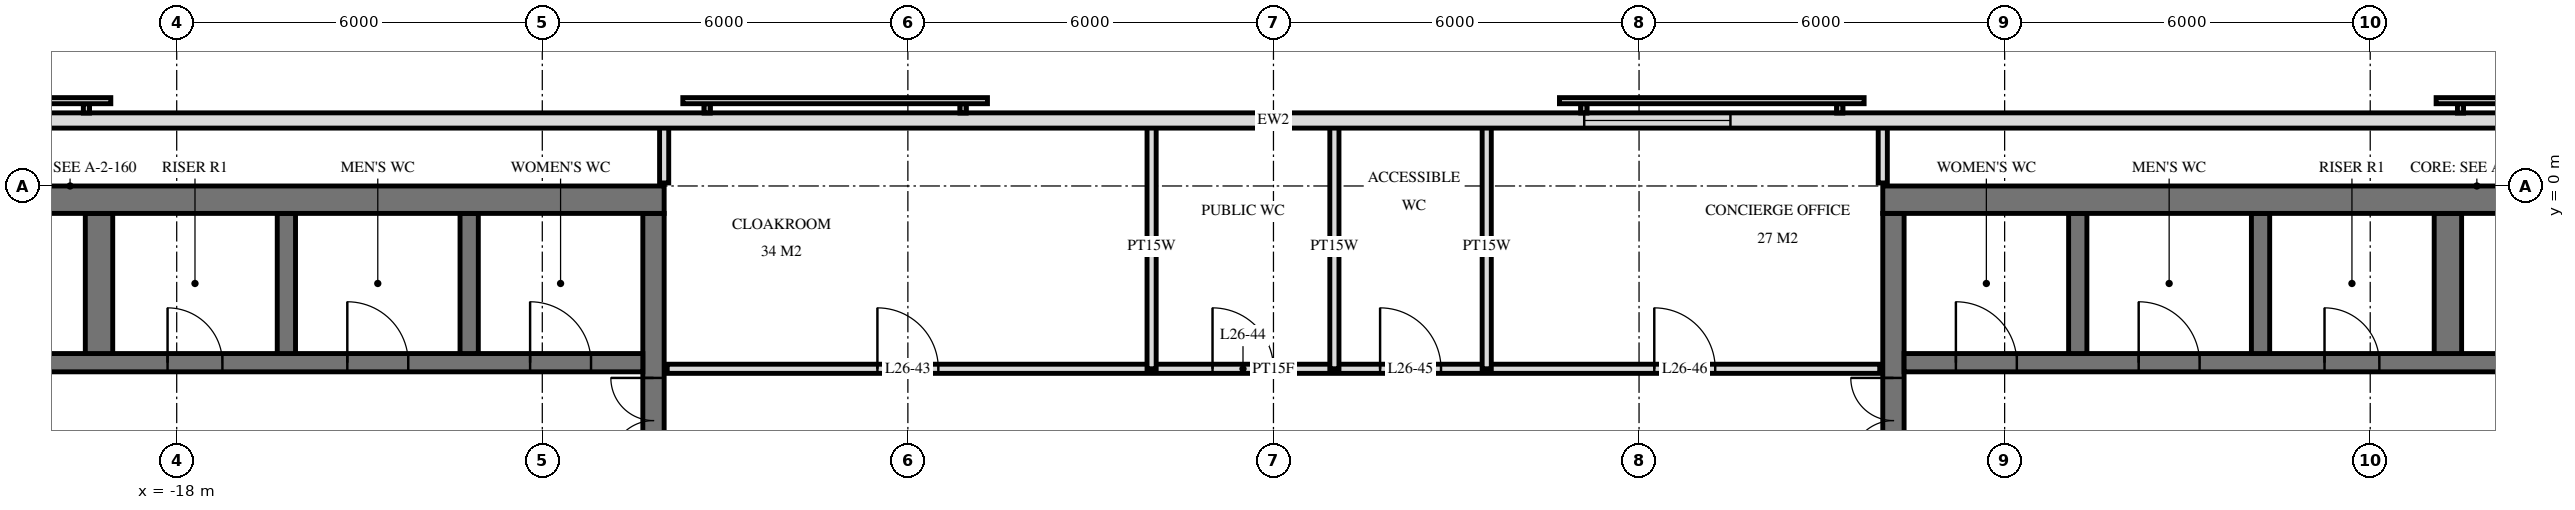
"""IFC4 building model, lengths in metres.
Left out: names, types, materials, properties, quantities, classifications, styles, units other than length and angle.
Written with IfcOpenShell. Run it as: python <this file> out.ifc"""

import sys

from ifc_helpers import new_model, si_unit, direction, frame, frame_2d, origin, place, context, subcontext, project, spatial, rectangle, extrude, element, fill, save


model = new_model("IFC4")
c1 = context("Model", 3, precision=1e-05, world=origin(), true_north=direction((0.0, 1.0)))
c2 = subcontext(c1, "Body", "Model", "MODEL_VIEW")
j1 = project(units=[si_unit("LENGTHUNIT", "METRE"), si_unit("PLANEANGLEUNIT", "RADIAN")], contexts=[c1])
p1 = place(None, origin())
s1 = spatial("IfcSite", under=j1, at=p1, CompositionType="ELEMENT")
p2 = place(p1, origin())
s2 = spatial("IfcBuilding", under=s1, at=p2, CompositionType="ELEMENT")
p3 = place(p2, frame((0.0, 0.0, 103.2)))
s3 = spatial("IfcBuildingStorey", under=s2, at=p3, CompositionType="ELEMENT", Elevation=103.2)
p4 = place(p3, frame((-29.5, -0.225, 0.0), z_axis=(0.0, 0.0, 1.0), x_axis=(1.0, 0.0, 0.0)))
e1 = element("IfcWall", 1, at=p4, inside=s3, PredefinedType="SHEAR", context=c2, shape_type="SweptSolid", body=[
    extrude(rectangle(XDim=19.5, YDim=0.45, at=frame_2d((9.75, 0.0))), origin(), (0.0, 0.0, 1.0), 3.6),
])
p5 = place(p3, frame((-10.175, -14.55, 0.0), z_axis=(0.0, 0.0, 1.0), x_axis=(0.0, 1.0, 0.0)))
e2 = element("IfcWall", 2, at=p5, inside=s3, PredefinedType="SHEAR", context=c2, shape_type="SweptSolid", body=[
    extrude(rectangle(XDim=14.1, YDim=0.35, at=frame_2d((7.05, 0.0))), origin(), (0.0, 0.0, 1.0), 3.6),
])
p6 = place(p5, frame((8.4, 0.0, 0.0)))
e3 = element("IfcOpeningElement", 3, at=p6, cuts=e2, PredefinedType="OPENING", context=c2, shape_type="SweptSolid", body=[
    extrude(rectangle(XDim=1.4, YDim=2.4, at=frame_2d((0.7, 1.2))), frame((0.0, 0.185, 0.0), z_axis=(0.0, -1.0, 0.0), x_axis=(1.0, 0.0, 0.0)), (0.0, 0.0, 1.0), 0.37),
])
p7 = place(p5, frame((10.0, 0.0, 0.0)))
e4 = element("IfcOpeningElement", 4, at=p7, cuts=e2, PredefinedType="OPENING", context=c2, shape_type="SweptSolid", body=[
    extrude(rectangle(XDim=1.4, YDim=2.4, at=frame_2d((0.7, 1.2))), frame((0.0, 0.185, 0.0), z_axis=(0.0, -1.0, 0.0), x_axis=(1.0, 0.0, 0.0)), (0.0, 0.0, 1.0), 0.37),
])
p8 = place(p5, frame((4.0, 0.0, 0.0)))
e5 = element("IfcOpeningElement", 5, at=p8, cuts=e2, PredefinedType="OPENING", context=c2, shape_type="SweptSolid", body=[
    extrude(rectangle(XDim=1.2, YDim=2.1, at=frame_2d((0.6, 1.05))), frame((0.0, 0.185, 0.0), z_axis=(0.0, -1.0, 0.0), x_axis=(1.0, 0.0, 0.0)), (0.0, 0.0, 1.0), 0.37),
])
p9 = place(p3, frame((-29.05, -2.9, 0.0), z_axis=(0.0, 0.0, 1.0), x_axis=(1.0, 0.0, 0.0)))
e6 = element("IfcWall", 6, at=p9, inside=s3, PredefinedType="SHEAR", context=c2, shape_type="SweptSolid", body=[
    extrude(rectangle(XDim=18.7, YDim=0.3, at=frame_2d((9.35, 0.0))), origin(), (0.0, 0.0, 1.0), 3.6),
])
p10 = place(p9, frame((2.95, 0.0, 0.0)))
e7 = element("IfcOpeningElement", 7, at=p10, cuts=e6, PredefinedType="OPENING", context=c2, shape_type="SweptSolid", body=[
    extrude(rectangle(XDim=1.1, YDim=2.1, at=frame_2d((0.55, 1.05))), frame((0.0, 0.16, 0.0), z_axis=(0.0, -1.0, 0.0), x_axis=(1.0, 0.0, 0.0)), (0.0, 0.0, 1.0), 0.32),
])
p11 = place(p9, frame((0.55, 0.0, 0.0)))
e8 = element("IfcOpeningElement", 8, at=p11, cuts=e6, PredefinedType="OPENING", context=c2, shape_type="SweptSolid", body=[
    extrude(rectangle(XDim=1.1, YDim=2.1, at=frame_2d((0.55, 1.05))), frame((0.0, 0.16, 0.0), z_axis=(0.0, -1.0, 0.0), x_axis=(1.0, 0.0, 0.0)), (0.0, 0.0, 1.0), 0.32),
])
p12 = place(p9, frame((10.9, 0.0, 0.0)))
e9 = element("IfcOpeningElement", 9, at=p12, cuts=e6, PredefinedType="OPENING", context=c2, shape_type="SweptSolid", body=[
    extrude(rectangle(XDim=0.9, YDim=2.1, at=frame_2d((0.45, 1.05))), frame((0.0, 0.16, 0.0), z_axis=(0.0, -1.0, 0.0), x_axis=(1.0, 0.0, 0.0)), (0.0, 0.0, 1.0), 0.32),
])
p13 = place(p9, frame((16.85, 0.0, 0.0)))
e10 = element("IfcOpeningElement", 10, at=p13, cuts=e6, PredefinedType="OPENING", context=c2, shape_type="SweptSolid", body=[
    extrude(rectangle(XDim=1.0, YDim=2.1, at=frame_2d((0.5, 1.05))), frame((0.0, 0.16, 0.0), z_axis=(0.0, -1.0, 0.0), x_axis=(1.0, 0.0, 0.0)), (0.0, 0.0, 1.0), 0.32),
])
p14 = place(p9, frame((13.85, 0.0, 0.0)))
e11 = element("IfcOpeningElement", 11, at=p14, cuts=e6, PredefinedType="OPENING", context=c2, shape_type="SweptSolid", body=[
    extrude(rectangle(XDim=1.0, YDim=2.1, at=frame_2d((0.5, 1.05))), frame((0.0, 0.16, 0.0), z_axis=(0.0, -1.0, 0.0), x_axis=(1.0, 0.0, 0.0)), (0.0, 0.0, 1.0), 0.32),
])
for number, where, z_axis, x_axis in (
    (12, (-13.2, -2.75, 0.0), (0.0, 0.0, 1.0), (0.0, 1.0, 0.0)),
    (13, (-16.2, -2.75, 0.0), (0.0, 0.0, 1.0), (0.0, 1.0, 0.0)),
):
    element("IfcWall", number, at=place(p3, frame(where, z_axis=z_axis, x_axis=x_axis)), inside=s3, PredefinedType="SHEAR", context=c2, shape_type="SweptSolid", body=[
        extrude(rectangle(XDim=2.3, YDim=0.3, at=frame_2d((1.15, 0.0))), origin(), (0.0, 0.0, 1.0), 3.6),
    ])
p15 = place(p3, frame((-19.275, -2.75, 0.0), z_axis=(0.0, 0.0, 1.0), x_axis=(0.0, 1.0, 0.0)))
e14 = element("IfcWall", 14, at=p15, inside=s3, PredefinedType="SHEAR", context=c2, shape_type="SweptSolid", body=[
    extrude(rectangle(XDim=2.3, YDim=0.45, at=frame_2d((1.15, 0.0))), origin(), (0.0, 0.0, 1.0), 3.6),
])
p16 = place(p3, frame((10.0, -0.225, 0.0), z_axis=(0.0, 0.0, 1.0), x_axis=(1.0, 0.0, 0.0)))
e15 = element("IfcWall", 15, at=p16, inside=s3, PredefinedType="SHEAR", context=c2, shape_type="SweptSolid", body=[
    extrude(rectangle(XDim=19.5, YDim=0.45, at=frame_2d((9.75, 0.0))), origin(), (0.0, 0.0, 1.0), 3.6),
])
p17 = place(p3, frame((10.175, -14.55, 0.0), z_axis=(0.0, 0.0, 1.0), x_axis=(0.0, 1.0, 0.0)))
e16 = element("IfcWall", 16, at=p17, inside=s3, PredefinedType="SHEAR", context=c2, shape_type="SweptSolid", body=[
    extrude(rectangle(XDim=14.1, YDim=0.35, at=frame_2d((7.05, 0.0))), origin(), (0.0, 0.0, 1.0), 3.6),
])
p18 = place(p17, frame((8.4, 0.0, 0.0)))
e17 = element("IfcOpeningElement", 17, at=p18, cuts=e16, PredefinedType="OPENING", context=c2, shape_type="SweptSolid", body=[
    extrude(rectangle(XDim=1.4, YDim=2.4, at=frame_2d((0.7, 1.2))), frame((0.0, 0.185, 0.0), z_axis=(0.0, -1.0, 0.0), x_axis=(1.0, 0.0, 0.0)), (0.0, 0.0, 1.0), 0.37),
])
p19 = place(p17, frame((10.0, 0.0, 0.0)))
e18 = element("IfcOpeningElement", 18, at=p19, cuts=e16, PredefinedType="OPENING", context=c2, shape_type="SweptSolid", body=[
    extrude(rectangle(XDim=1.4, YDim=2.4, at=frame_2d((0.7, 1.2))), frame((0.0, 0.185, 0.0), z_axis=(0.0, -1.0, 0.0), x_axis=(1.0, 0.0, 0.0)), (0.0, 0.0, 1.0), 0.37),
])
p20 = place(p17, frame((4.0, 0.0, 0.0)))
e19 = element("IfcOpeningElement", 19, at=p20, cuts=e16, PredefinedType="OPENING", context=c2, shape_type="SweptSolid", body=[
    extrude(rectangle(XDim=1.2, YDim=2.1, at=frame_2d((0.6, 1.05))), frame((0.0, 0.185, 0.0), z_axis=(0.0, -1.0, 0.0), x_axis=(1.0, 0.0, 0.0)), (0.0, 0.0, 1.0), 0.37),
])
p21 = place(p3, frame((10.35, -2.9, 0.0), z_axis=(0.0, 0.0, 1.0), x_axis=(1.0, 0.0, 0.0)))
e20 = element("IfcWall", 20, at=p21, inside=s3, PredefinedType="SHEAR", context=c2, shape_type="SweptSolid", body=[
    extrude(rectangle(XDim=18.7, YDim=0.3, at=frame_2d((9.35, 0.0))), origin(), (0.0, 0.0, 1.0), 3.6),
])
p22 = place(p21, frame((14.65, 0.0, 0.0)))
e21 = element("IfcOpeningElement", 21, at=p22, cuts=e20, PredefinedType="OPENING", context=c2, shape_type="SweptSolid", body=[
    extrude(rectangle(XDim=1.1, YDim=2.1, at=frame_2d((0.55, 1.05))), frame((0.0, 0.16, 0.0), z_axis=(0.0, -1.0, 0.0), x_axis=(1.0, 0.0, 0.0)), (0.0, 0.0, 1.0), 0.32),
])
p23 = place(p21, frame((17.05, 0.0, 0.0)))
e22 = element("IfcOpeningElement", 22, at=p23, cuts=e20, PredefinedType="OPENING", context=c2, shape_type="SweptSolid", body=[
    extrude(rectangle(XDim=1.1, YDim=2.1, at=frame_2d((0.55, 1.05))), frame((0.0, 0.16, 0.0), z_axis=(0.0, -1.0, 0.0), x_axis=(1.0, 0.0, 0.0)), (0.0, 0.0, 1.0), 0.32),
])
p24 = place(p21, frame((6.9, 0.0, 0.0)))
e23 = element("IfcOpeningElement", 23, at=p24, cuts=e20, PredefinedType="OPENING", context=c2, shape_type="SweptSolid", body=[
    extrude(rectangle(XDim=0.9, YDim=2.1, at=frame_2d((0.45, 1.05))), frame((0.0, 0.16, 0.0), z_axis=(0.0, -1.0, 0.0), x_axis=(1.0, 0.0, 0.0)), (0.0, 0.0, 1.0), 0.32),
])
p25 = place(p21, frame((0.85, 0.0, 0.0)))
e24 = element("IfcOpeningElement", 24, at=p25, cuts=e20, PredefinedType="OPENING", context=c2, shape_type="SweptSolid", body=[
    extrude(rectangle(XDim=1.0, YDim=2.1, at=frame_2d((0.5, 1.05))), frame((0.0, 0.16, 0.0), z_axis=(0.0, -1.0, 0.0), x_axis=(1.0, 0.0, 0.0)), (0.0, 0.0, 1.0), 0.32),
])
p26 = place(p21, frame((3.85, 0.0, 0.0)))
e25 = element("IfcOpeningElement", 25, at=p26, cuts=e20, PredefinedType="OPENING", context=c2, shape_type="SweptSolid", body=[
    extrude(rectangle(XDim=1.0, YDim=2.1, at=frame_2d((0.5, 1.05))), frame((0.0, 0.16, 0.0), z_axis=(0.0, -1.0, 0.0), x_axis=(1.0, 0.0, 0.0)), (0.0, 0.0, 1.0), 0.32),
])
for number, where, z_axis, x_axis in (
    (26, (13.2, -2.75, 0.0), (0.0, 0.0, 1.0), (0.0, 1.0, 0.0)),
    (27, (16.2, -2.75, 0.0), (0.0, 0.0, 1.0), (0.0, 1.0, 0.0)),
):
    element("IfcWall", number, at=place(p3, frame(where, z_axis=z_axis, x_axis=x_axis)), inside=s3, PredefinedType="SHEAR", context=c2, shape_type="SweptSolid", body=[
        extrude(rectangle(XDim=2.3, YDim=0.3, at=frame_2d((1.15, 0.0))), origin(), (0.0, 0.0, 1.0), 3.6),
    ])
p27 = place(p3, frame((19.275, -2.75, 0.0), z_axis=(0.0, 0.0, 1.0), x_axis=(0.0, 1.0, 0.0)))
e28 = element("IfcWall", 28, at=p27, inside=s3, PredefinedType="SHEAR", context=c2, shape_type="SweptSolid", body=[
    extrude(rectangle(XDim=2.3, YDim=0.45, at=frame_2d((1.15, 0.0))), origin(), (0.0, 0.0, 1.0), 3.6),
])
p28 = place(p3, frame((28.775, 1.075, 0.0), z_axis=(0.0, 0.0, 1.0), x_axis=(-1.0, 0.0, 0.0)))
e29 = element("IfcWall", 29, at=p28, inside=s3, PredefinedType="SOLIDWALL", context=c2, shape_type="SweptSolid", body=[
    extrude(rectangle(XDim=57.551, YDim=0.25, at=frame_2d((28.775, 0.0))), origin(), (0.0, 0.0, 1.0), 3.3),
])
p29 = place(p28, frame((21.275, 0.0, 0.3)))
e30 = element("IfcOpeningElement", 30, at=p29, cuts=e29, PredefinedType="OPENING", context=c2, shape_type="SweptSolid", body=[
    extrude(rectangle(XDim=2.4, YDim=2.1, at=frame_2d((1.2, 1.05))), frame((0.0, 0.135, 0.0), z_axis=(0.0, -1.0, 0.0), x_axis=(1.0, 0.0, 0.0)), (0.0, 0.0, 1.0), 0.27),
])
p30 = place(p3, frame((10.0, 0.05, 0.0), z_axis=(0.0, 0.0, 1.0), x_axis=(0.0, 1.0, 0.0)))
e31 = element("IfcWall", 31, at=p30, inside=s3, PredefinedType="PARTITIONING", context=c2, shape_type="SweptSolid", body=[
    extrude(rectangle(XDim=0.97, YDim=0.15, at=frame_2d((0.485, 0.0))), origin(), (0.0, 0.0, 1.0), 3.32),
])
for number, where, z_axis, x_axis in (
    (32, (3.5, -3.0, 0.0), (0.0, 0.0, 1.0), (0.0, 1.0, 0.0)),
    (33, (1.0, -3.0, 0.0), (0.0, 0.0, 1.0), (0.0, 1.0, 0.0)),
    (34, (-2.0, -3.0, 0.0), (0.0, 0.0, 1.0), (0.0, 1.0, 0.0)),
):
    element("IfcWall", number, at=place(p3, frame(where, z_axis=z_axis, x_axis=x_axis)), inside=s3, PredefinedType="PLUMBINGWALL", context=c2, shape_type="SweptSolid", body=[
        extrude(rectangle(XDim=4.02, YDim=0.15, at=frame_2d((2.01, 0.0))), origin(), (0.0, 0.0, 1.0), 3.32),
    ])
p31 = place(p3, frame((-10.0, 0.05, 0.0), z_axis=(0.0, 0.0, 1.0), x_axis=(0.0, 1.0, 0.0)))
e35 = element("IfcWall", 35, at=p31, inside=s3, PredefinedType="PARTITIONING", context=c2, shape_type="SweptSolid", body=[
    extrude(rectangle(XDim=0.97, YDim=0.15, at=frame_2d((0.485, 0.0))), origin(), (0.0, 0.0, 1.0), 3.32),
])
p32 = place(p3, frame((-9.95, -3.0, 0.0), z_axis=(0.0, 0.0, 1.0), x_axis=(1.0, 0.0, 0.0)))
e36 = element("IfcWall", 36, at=p32, inside=s3, PredefinedType="PARTITIONING", context=c2, shape_type="SweptSolid", body=[
    extrude(rectangle(XDim=19.9, YDim=0.15, at=frame_2d((9.95, 0.0))), origin(), (0.0, 0.0, 1.0), 3.32),
])
p33 = place(p32, frame((3.45, 0.0, 0.0)))
e37 = element("IfcOpeningElement", 37, at=p33, cuts=e36, PredefinedType="OPENING", context=c2, shape_type="SweptSolid", body=[
    extrude(rectangle(XDim=1.0, YDim=2.1, at=frame_2d((0.5, 1.05))), frame((0.0, 0.085, 0.0), z_axis=(0.0, -1.0, 0.0), x_axis=(1.0, 0.0, 0.0)), (0.0, 0.0, 1.0), 0.17),
])
p34 = place(p32, frame((8.95, 0.0, 0.0)))
e38 = element("IfcOpeningElement", 38, at=p34, cuts=e36, PredefinedType="OPENING", context=c2, shape_type="SweptSolid", body=[
    extrude(rectangle(XDim=1.0, YDim=2.1, at=frame_2d((0.5, 1.05))), frame((0.0, 0.085, 0.0), z_axis=(0.0, -1.0, 0.0), x_axis=(1.0, 0.0, 0.0)), (0.0, 0.0, 1.0), 0.17),
])
p35 = place(p32, frame((11.7, 0.0, 0.0)))
e39 = element("IfcOpeningElement", 39, at=p35, cuts=e36, PredefinedType="OPENING", context=c2, shape_type="SweptSolid", body=[
    extrude(rectangle(XDim=1.0, YDim=2.1, at=frame_2d((0.5, 1.05))), frame((0.0, 0.085, 0.0), z_axis=(0.0, -1.0, 0.0), x_axis=(1.0, 0.0, 0.0)), (0.0, 0.0, 1.0), 0.17),
])
p36 = place(p32, frame((16.2, 0.0, 0.0)))
e40 = element("IfcOpeningElement", 40, at=p36, cuts=e36, PredefinedType="OPENING", context=c2, shape_type="SweptSolid", body=[
    extrude(rectangle(XDim=1.0, YDim=2.1, at=frame_2d((0.5, 1.05))), frame((0.0, 0.085, 0.0), z_axis=(0.0, -1.0, 0.0), x_axis=(1.0, 0.0, 0.0)), (0.0, 0.0, 1.0), 0.17),
])
p37 = place(p29, origin())
e41 = element("IfcWindow", 41, at=p37, inside=s3, PartitioningType="SINGLE_PANEL", PredefinedType="WINDOW", context=c2, shape_type="SweptSolid", body=[
    extrude(rectangle(XDim=2.4, YDim=2.1, at=frame_2d((1.2, 1.05))), frame((0.0, 0.03, 0.0), z_axis=(0.0, -1.0, 0.0), x_axis=(1.0, 0.0, 0.0)), (0.0, 0.0, 1.0), 0.06),
])
fill(e30, e41)
p38 = place(p7, origin())
e42 = element("IfcDoor", 42, at=p38, inside=s3, OperationType="DOUBLE_DOOR_SINGLE_SWING", PredefinedType="DOOR", context=c2, shape_type="SweptSolid", body=[
    extrude(rectangle(XDim=1.4, YDim=2.4, at=frame_2d((0.7, 1.2))), frame((0.0, 0.025, 0.0), z_axis=(0.0, -1.0, 0.0), x_axis=(1.0, 0.0, 0.0)), (0.0, 0.0, 1.0), 0.05),
])
fill(e4, e42)
p39 = place(p12, origin())
e43 = element("IfcDoor", 43, at=p39, inside=s3, OperationType="SINGLE_SWING_RIGHT", PredefinedType="DOOR", context=c2, shape_type="SweptSolid", body=[
    extrude(rectangle(XDim=0.9, YDim=2.1, at=frame_2d((0.45, 1.05))), frame((0.0, 0.025, 0.0), z_axis=(0.0, -1.0, 0.0), x_axis=(1.0, 0.0, 0.0)), (0.0, 0.0, 1.0), 0.05),
])
fill(e9, e43)
p40 = place(p13, origin())
e44 = element("IfcDoor", 44, at=p40, inside=s3, OperationType="SINGLE_SWING_RIGHT", PredefinedType="DOOR", context=c2, shape_type="SweptSolid", body=[
    extrude(rectangle(XDim=1.0, YDim=2.1, at=frame_2d((0.5, 1.05))), frame((0.0, 0.025, 0.0), z_axis=(0.0, -1.0, 0.0), x_axis=(1.0, 0.0, 0.0)), (0.0, 0.0, 1.0), 0.05),
])
fill(e10, e44)
p41 = place(p14, origin())
e45 = element("IfcDoor", 45, at=p41, inside=s3, OperationType="SINGLE_SWING_RIGHT", PredefinedType="DOOR", context=c2, shape_type="SweptSolid", body=[
    extrude(rectangle(XDim=1.0, YDim=2.1, at=frame_2d((0.5, 1.05))), frame((0.0, 0.025, 0.0), z_axis=(0.0, -1.0, 0.0), x_axis=(1.0, 0.0, 0.0)), (0.0, 0.0, 1.0), 0.05),
])
fill(e11, e45)
p42 = place(p19, origin())
e46 = element("IfcDoor", 46, at=p42, inside=s3, OperationType="DOUBLE_DOOR_SINGLE_SWING", PredefinedType="DOOR", context=c2, shape_type="SweptSolid", body=[
    extrude(rectangle(XDim=1.4, YDim=2.4, at=frame_2d((0.7, 1.2))), frame((0.0, 0.025, 0.0), z_axis=(0.0, -1.0, 0.0), x_axis=(1.0, 0.0, 0.0)), (0.0, 0.0, 1.0), 0.05),
])
fill(e18, e46)
p43 = place(p24, origin())
e47 = element("IfcDoor", 47, at=p43, inside=s3, OperationType="SINGLE_SWING_RIGHT", PredefinedType="DOOR", context=c2, shape_type="SweptSolid", body=[
    extrude(rectangle(XDim=0.9, YDim=2.1, at=frame_2d((0.45, 1.05))), frame((0.0, 0.025, 0.0), z_axis=(0.0, -1.0, 0.0), x_axis=(1.0, 0.0, 0.0)), (0.0, 0.0, 1.0), 0.05),
])
fill(e23, e47)
p44 = place(p25, origin())
e48 = element("IfcDoor", 48, at=p44, inside=s3, OperationType="SINGLE_SWING_RIGHT", PredefinedType="DOOR", context=c2, shape_type="SweptSolid", body=[
    extrude(rectangle(XDim=1.0, YDim=2.1, at=frame_2d((0.5, 1.05))), frame((0.0, 0.025, 0.0), z_axis=(0.0, -1.0, 0.0), x_axis=(1.0, 0.0, 0.0)), (0.0, 0.0, 1.0), 0.05),
])
fill(e24, e48)
p45 = place(p26, origin())
e49 = element("IfcDoor", 49, at=p45, inside=s3, OperationType="SINGLE_SWING_RIGHT", PredefinedType="DOOR", context=c2, shape_type="SweptSolid", body=[
    extrude(rectangle(XDim=1.0, YDim=2.1, at=frame_2d((0.5, 1.05))), frame((0.0, 0.025, 0.0), z_axis=(0.0, -1.0, 0.0), x_axis=(1.0, 0.0, 0.0)), (0.0, 0.0, 1.0), 0.05),
])
fill(e25, e49)
p46 = place(p33, origin())
e50 = element("IfcDoor", 50, at=p46, inside=s3, OperationType="SINGLE_SWING_RIGHT", PredefinedType="DOOR", context=c2, shape_type="SweptSolid", body=[
    extrude(rectangle(XDim=1.0, YDim=2.1, at=frame_2d((0.5, 1.05))), frame((0.0, 0.025, 0.0), z_axis=(0.0, -1.0, 0.0), x_axis=(1.0, 0.0, 0.0)), (0.0, 0.0, 1.0), 0.05),
])
fill(e37, e50)
p47 = place(p34, origin())
e51 = element("IfcDoor", 51, at=p47, inside=s3, OperationType="SINGLE_SWING_RIGHT", PredefinedType="DOOR", context=c2, shape_type="SweptSolid", body=[
    extrude(rectangle(XDim=1.0, YDim=2.1, at=frame_2d((0.5, 1.05))), frame((0.0, 0.025, 0.0), z_axis=(0.0, -1.0, 0.0), x_axis=(1.0, 0.0, 0.0)), (0.0, 0.0, 1.0), 0.05),
])
fill(e38, e51)
p48 = place(p35, origin())
e52 = element("IfcDoor", 52, at=p48, inside=s3, OperationType="SINGLE_SWING_RIGHT", PredefinedType="DOOR", context=c2, shape_type="SweptSolid", body=[
    extrude(rectangle(XDim=1.0, YDim=2.1, at=frame_2d((0.5, 1.05))), frame((0.0, 0.025, 0.0), z_axis=(0.0, -1.0, 0.0), x_axis=(1.0, 0.0, 0.0)), (0.0, 0.0, 1.0), 0.05),
])
fill(e39, e52)
p49 = place(p36, origin())
e53 = element("IfcDoor", 53, at=p49, inside=s3, OperationType="SINGLE_SWING_RIGHT", PredefinedType="DOOR", context=c2, shape_type="SweptSolid", body=[
    extrude(rectangle(XDim=1.0, YDim=2.1, at=frame_2d((0.5, 1.05))), frame((0.0, 0.025, 0.0), z_axis=(0.0, -1.0, 0.0), x_axis=(1.0, 0.0, 0.0)), (0.0, 0.0, 1.0), 0.05),
])
fill(e40, e53)
save(model, sys.argv[1])
